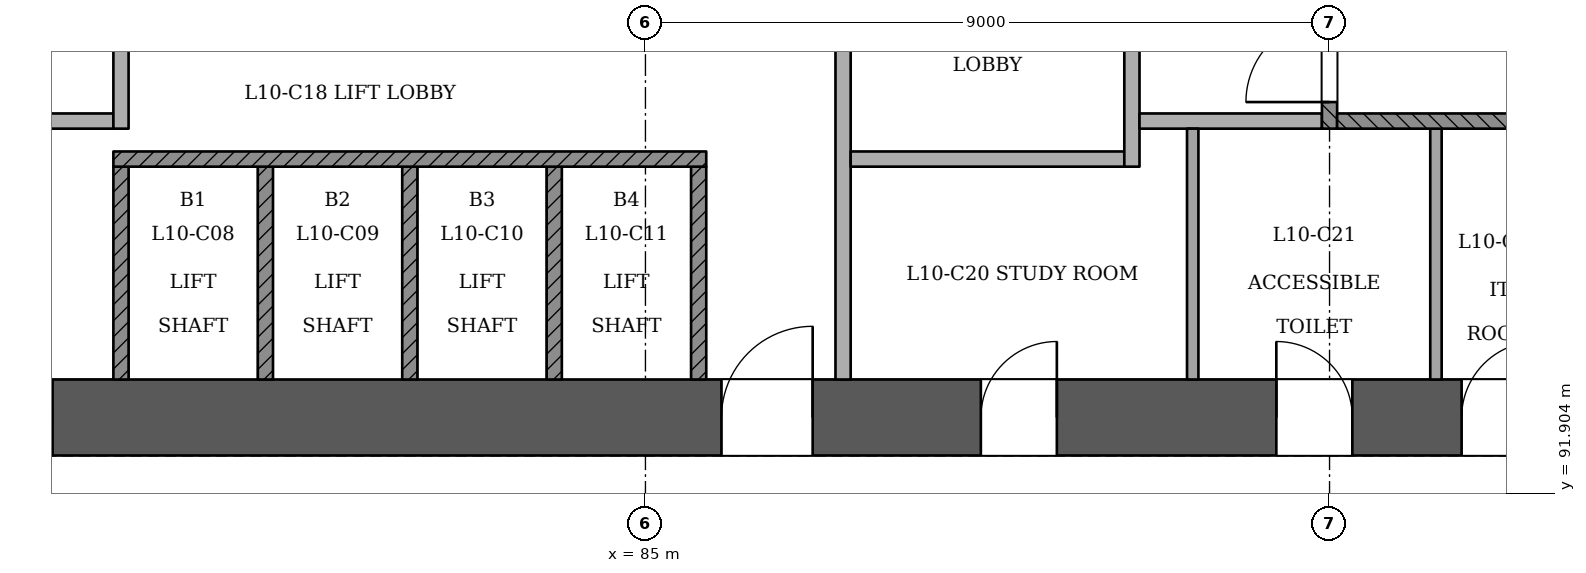
"""IFC4 building model, lengths in metres.
Left out: names, types, materials, properties, quantities, classifications, styles, units other than length and angle.
Written with IfcOpenShell. Run it as: python <this file> out.ifc"""

import sys

from ifc_helpers import new_model, si_unit, direction, frame, frame_2d, origin, place, context, subcontext, project, spatial, rectangle, extrude, element, fill, save


model = new_model("IFC4")
c1 = context("Model", 3, precision=1e-05, world=origin(), true_north=direction((0.0, 1.0)))
c2 = subcontext(c1, "Body", "Model", "MODEL_VIEW")
j1 = project(units=[si_unit("LENGTHUNIT", "METRE"), si_unit("PLANEANGLEUNIT", "RADIAN")], contexts=[c1])
p1 = place(None, origin())
s1 = spatial("IfcSite", under=j1, at=p1, CompositionType="ELEMENT")
p2 = place(p1, origin())
s2 = spatial("IfcBuilding", under=s1, at=p2, CompositionType="ELEMENT")
p3 = place(p2, frame((0.0, 0.0, 45.0)))
s3 = spatial("IfcBuildingStorey", under=s2, at=p3, CompositionType="ELEMENT", Elevation=45.0)
p4 = place(p3, frame((72.5, 92.9, 0.0), z_axis=(0.0, 0.0, 1.0), x_axis=(1.0, 0.0, 0.0)))
e1 = element("IfcWall", 1, at=p4, inside=s3, PredefinedType="SHEAR", context=c2, shape_type="SweptSolid", body=[
    extrude(rectangle(XDim=25.5, YDim=1.0, at=frame_2d((12.75, 0.0))), origin(), (0.0, 0.0, 1.0), 3.6),
])
p5 = place(p4, frame((1.3, 0.0, 0.0)))
e2 = element("IfcOpeningElement", 2, at=p5, cuts=e1, PredefinedType="OPENING", context=c2, shape_type="SweptSolid", body=[
    extrude(rectangle(XDim=1.2, YDim=2.1, at=frame_2d((0.6, 1.05))), frame((0.0, 0.51, 0.0), z_axis=(0.0, -1.0, 0.0), x_axis=(1.0, 0.0, 0.0)), (0.0, 0.0, 1.0), 1.021),
])
p6 = place(p4, frame((3.5, 0.0, 0.0)))
e3 = element("IfcOpeningElement", 3, at=p6, cuts=e1, PredefinedType="OPENING", context=c2, shape_type="SweptSolid", body=[
    extrude(rectangle(XDim=1.2, YDim=2.1, at=frame_2d((0.6, 1.05))), frame((0.0, 0.51, 0.0), z_axis=(0.0, -1.0, 0.0), x_axis=(1.0, 0.0, 0.0)), (0.0, 0.0, 1.0), 1.021),
])
p7 = place(p4, frame((13.5, 0.0, 0.0)))
e4 = element("IfcOpeningElement", 4, at=p7, cuts=e1, PredefinedType="OPENING", context=c2, shape_type="SweptSolid", body=[
    extrude(rectangle(XDim=1.2, YDim=2.1, at=frame_2d((0.6, 1.05))), frame((0.0, 0.51, 0.0), z_axis=(0.0, -1.0, 0.0), x_axis=(1.0, 0.0, 0.0)), (0.0, 0.0, 1.0), 1.021),
])
p8 = place(p4, frame((16.913, 0.0, 0.0)))
e5 = element("IfcOpeningElement", 5, at=p8, cuts=e1, PredefinedType="OPENING", context=c2, shape_type="SweptSolid", body=[
    extrude(rectangle(XDim=1.0, YDim=2.1, at=frame_2d((0.5, 1.05))), frame((0.0, 0.51, 0.0), z_axis=(0.0, -1.0, 0.0), x_axis=(1.0, 0.0, 0.0)), (0.0, 0.0, 1.0), 1.021),
])
p9 = place(p4, frame((20.8, 0.0, 0.0)))
e6 = element("IfcOpeningElement", 6, at=p9, cuts=e1, PredefinedType="OPENING", context=c2, shape_type="SweptSolid", body=[
    extrude(rectangle(XDim=1.0, YDim=2.1, at=frame_2d((0.5, 1.05))), frame((0.0, 0.51, 0.0), z_axis=(0.0, -1.0, 0.0), x_axis=(1.0, 0.0, 0.0)), (0.0, 0.0, 1.0), 1.021),
])
p10 = place(p4, frame((23.238, 0.0, 0.0)))
e7 = element("IfcOpeningElement", 7, at=p10, cuts=e1, PredefinedType="OPENING", context=c2, shape_type="SweptSolid", body=[
    extrude(rectangle(XDim=1.0, YDim=2.1, at=frame_2d((0.5, 1.05))), frame((0.0, 0.51, 0.0), z_axis=(0.0, -1.0, 0.0), x_axis=(1.0, 0.0, 0.0)), (0.0, 0.0, 1.0), 1.021),
])
p11 = place(p3, frame((61.853, 96.477, 0.0), z_axis=(0.0, 0.0, 1.0), x_axis=(0.500000327816, -0.86602521452, 0.0)))
e8 = element("IfcWall", 8, at=p11, inside=s3, PredefinedType="PARTITIONING", context=c2, shape_type="SweptSolid", body=[
    extrude(rectangle(XDim=39.979, YDim=0.15, at=frame_2d((19.99, 0.0))), origin(), (0.0, 0.0, 1.0), 2.7),
])
p12 = place(p11, frame((1.49, 0.0, 0.0)))
e9 = element("IfcOpeningElement", 9, at=p12, cuts=e8, PredefinedType="OPENING", context=c2, shape_type="SweptSolid", body=[
    extrude(rectangle(XDim=1.0, YDim=2.1, at=frame_2d((0.5, 1.05))), frame((0.0, 0.085, 0.0), z_axis=(0.0, -1.0, 0.0), x_axis=(1.0, 0.0, 0.0)), (0.0, 0.0, 1.0), 0.171),
])
p13 = place(p11, frame((4.55, 0.0, 0.0)))
e10 = element("IfcOpeningElement", 10, at=p13, cuts=e8, PredefinedType="OPENING", context=c2, shape_type="SweptSolid", body=[
    extrude(rectangle(XDim=1.1, YDim=2.1, at=frame_2d((0.55, 1.05))), frame((0.0, 0.085, 0.0), z_axis=(0.0, -1.0, 0.0), x_axis=(1.0, 0.0, 0.0)), (0.0, 0.0, 1.0), 0.171),
])
p14 = place(p11, frame((11.259, 0.0, 0.0)))
e11 = element("IfcOpeningElement", 11, at=p14, cuts=e8, PredefinedType="OPENING", context=c2, shape_type="SweptSolid", body=[
    extrude(rectangle(XDim=1.0, YDim=2.1, at=frame_2d((0.5, 1.05))), frame((0.0, 0.085, 0.0), z_axis=(0.0, -1.0, 0.0), x_axis=(1.0, 0.0, 0.0)), (0.0, 0.0, 1.0), 0.171),
])
p15 = place(p11, frame((17.979, 0.0, 0.0)))
e12 = element("IfcOpeningElement", 12, at=p15, cuts=e8, PredefinedType="OPENING", context=c2, shape_type="SweptSolid", body=[
    extrude(rectangle(XDim=1.2, YDim=2.1, at=frame_2d((0.6, 1.05))), frame((0.0, 0.085, 0.0), z_axis=(0.0, -1.0, 0.0), x_axis=(1.0, 0.0, 0.0)), (0.0, 0.0, 1.0), 0.171),
])
p16 = place(p11, frame((22.699, 0.0, 0.0)))
e13 = element("IfcOpeningElement", 13, at=p16, cuts=e8, PredefinedType="OPENING", context=c2, shape_type="SweptSolid", body=[
    extrude(rectangle(XDim=1.0, YDim=2.1, at=frame_2d((0.5, 1.05))), frame((0.0, 0.085, 0.0), z_axis=(0.0, -1.0, 0.0), x_axis=(1.0, 0.0, 0.0)), (0.0, 0.0, 1.0), 0.171),
])
p17 = place(p11, frame((29.374, 0.0, 0.0)))
e14 = element("IfcOpeningElement", 14, at=p17, cuts=e8, PredefinedType="OPENING", context=c2, shape_type="SweptSolid", body=[
    extrude(rectangle(XDim=1.0, YDim=2.1, at=frame_2d((0.5, 1.05))), frame((0.0, 0.085, 0.0), z_axis=(0.0, -1.0, 0.0), x_axis=(1.0, 0.0, 0.0)), (0.0, 0.0, 1.0), 0.171),
])
p18 = place(p11, frame((31.584, 0.0, 0.0)))
e15 = element("IfcOpeningElement", 15, at=p18, cuts=e8, PredefinedType="OPENING", context=c2, shape_type="SweptSolid", body=[
    extrude(rectangle(XDim=1.0, YDim=2.1, at=frame_2d((0.5, 1.05))), frame((0.0, 0.085, 0.0), z_axis=(0.0, -1.0, 0.0), x_axis=(1.0, 0.0, 0.0)), (0.0, 0.0, 1.0), 0.171),
])
p19 = place(p11, frame((38.374, 0.0, 0.0)))
e16 = element("IfcOpeningElement", 16, at=p19, cuts=e8, PredefinedType="OPENING", context=c2, shape_type="SweptSolid", body=[
    extrude(rectangle(XDim=1.0, YDim=2.1, at=frame_2d((0.5, 1.05))), frame((0.0, 0.085, 0.0), z_axis=(0.0, -1.0, 0.0), x_axis=(1.0, 0.0, 0.0)), (0.0, 0.0, 1.0), 0.171),
])
p20 = place(p3, frame((89.157, 63.586, 0.0), z_axis=(0.0, 0.0, 1.0), x_axis=(0.500000960059, 0.866024849493, 0.0)))
e17 = element("IfcWall", 17, at=p20, inside=s3, PredefinedType="PARTITIONING", context=c2, shape_type="SweptSolid", body=[
    extrude(rectangle(XDim=36.6, YDim=0.15, at=frame_2d((18.3, 0.0))), origin(), (0.0, 0.0, 1.0), 2.7),
])
p21 = place(p20, frame((5.395, 0.0, 0.0)))
e18 = element("IfcOpeningElement", 18, at=p21, cuts=e17, PredefinedType="OPENING", context=c2, shape_type="SweptSolid", body=[
    extrude(rectangle(XDim=1.0, YDim=2.1, at=frame_2d((0.5, 1.05))), frame((0.0, 0.085, 0.0), z_axis=(0.0, -1.0, 0.0), x_axis=(1.0, 0.0, 0.0)), (0.0, 0.0, 1.0), 0.171),
])
p22 = place(p20, frame((7.605, 0.0, 0.0)))
e19 = element("IfcOpeningElement", 19, at=p22, cuts=e17, PredefinedType="OPENING", context=c2, shape_type="SweptSolid", body=[
    extrude(rectangle(XDim=1.0, YDim=2.1, at=frame_2d((0.5, 1.05))), frame((0.0, 0.085, 0.0), z_axis=(0.0, -1.0, 0.0), x_axis=(1.0, 0.0, 0.0)), (0.0, 0.0, 1.0), 0.171),
])
p23 = place(p20, frame((13.25, 0.0, 0.0)))
e20 = element("IfcOpeningElement", 20, at=p23, cuts=e17, PredefinedType="OPENING", context=c2, shape_type="SweptSolid", body=[
    extrude(rectangle(XDim=1.0, YDim=2.1, at=frame_2d((0.5, 1.05))), frame((0.0, 0.085, 0.0), z_axis=(0.0, -1.0, 0.0), x_axis=(1.0, 0.0, 0.0)), (0.0, 0.0, 1.0), 0.171),
])
p24 = place(p20, frame((16.605, 0.0, 0.0)))
e21 = element("IfcOpeningElement", 21, at=p24, cuts=e17, PredefinedType="OPENING", context=c2, shape_type="SweptSolid", body=[
    extrude(rectangle(XDim=1.0, YDim=2.1, at=frame_2d((0.5, 1.05))), frame((0.0, 0.085, 0.0), z_axis=(0.0, -1.0, 0.0), x_axis=(1.0, 0.0, 0.0)), (0.0, 0.0, 1.0), 0.171),
])
p25 = place(p20, frame((23.395, 0.0, 0.0)))
e22 = element("IfcOpeningElement", 22, at=p25, cuts=e17, PredefinedType="OPENING", context=c2, shape_type="SweptSolid", body=[
    extrude(rectangle(XDim=1.0, YDim=2.1, at=frame_2d((0.5, 1.05))), frame((0.0, 0.085, 0.0), z_axis=(0.0, -1.0, 0.0), x_axis=(1.0, 0.0, 0.0)), (0.0, 0.0, 1.0), 0.171),
])
p26 = place(p20, frame((27.8, 0.0, 0.0)))
e23 = element("IfcOpeningElement", 23, at=p26, cuts=e17, PredefinedType="OPENING", context=c2, shape_type="SweptSolid", body=[
    extrude(rectangle(XDim=1.2, YDim=2.1, at=frame_2d((0.6, 1.05))), frame((0.0, 0.085, 0.0), z_axis=(0.0, -1.0, 0.0), x_axis=(1.0, 0.0, 0.0)), (0.0, 0.0, 1.0), 0.171),
])
p27 = place(p20, frame((35.36, 0.0, 0.0)))
e24 = element("IfcOpeningElement", 24, at=p27, cuts=e17, PredefinedType="OPENING", context=c2, shape_type="SweptSolid", body=[
    extrude(rectangle(XDim=1.0, YDim=2.1, at=frame_2d((0.5, 1.05))), frame((0.0, 0.085, 0.0), z_axis=(0.0, -1.0, 0.0), x_axis=(1.0, 0.0, 0.0)), (0.0, 0.0, 1.0), 0.171),
])
for number, where, z_axis, x_axis in (
    (25, (78.1, 93.4, 0.0), (0.0, 0.0, 1.0), (0.0, 1.0, 0.0)),
    (26, (80.0, 93.4, 0.0), (0.0, 0.0, 1.0), (0.0, 1.0, 0.0)),
    (27, (81.9, 93.4, 0.0), (0.0, 0.0, 1.0), (0.0, 1.0, 0.0)),
    (28, (83.8, 93.4, 0.0), (0.0, 0.0, 1.0), (0.0, 1.0, 0.0)),
    (29, (85.7, 93.4, 0.0), (0.0, 0.0, 1.0), (0.0, 1.0, 0.0)),
):
    element("IfcWall", number, at=place(p3, frame(where, z_axis=z_axis, x_axis=x_axis)), inside=s3, PredefinedType="SOLIDWALL", context=c2, shape_type="SweptSolid", body=[
        extrude(rectangle(XDim=2.8, YDim=0.2, at=frame_2d((1.4, 0.0))), origin(), (0.0, 0.0, 1.0), 3.1),
    ])
p28 = place(p3, frame((87.6, 93.4, 0.0), z_axis=(0.0, 0.0, 1.0), x_axis=(0.0, 1.0, 0.0)))
e30 = element("IfcWall", 30, at=p28, inside=s3, PredefinedType="PARTITIONING", context=c2, shape_type="SweptSolid", body=[
    extrude(rectangle(XDim=7.0, YDim=0.2, at=frame_2d((3.5, 0.0))), origin(), (0.0, 0.0, 1.0), 3.1),
])
p29 = place(p28, frame((4.45, 0.0, 0.0)))
e31 = element("IfcOpeningElement", 31, at=p29, cuts=e30, PredefinedType="OPENING", context=c2, shape_type="SweptSolid", body=[
    extrude(rectangle(XDim=1.1, YDim=2.1, at=frame_2d((0.55, 1.05))), frame((0.0, 0.11, 0.0), z_axis=(0.0, -1.0, 0.0), x_axis=(1.0, 0.0, 0.0)), (0.0, 0.0, 1.0), 0.221),
])
for number, where, z_axis, x_axis in (
    (32, (92.2, 93.4, 0.0), (0.0, 0.0, 1.0), (0.0, 1.0, 0.0)),
    (33, (95.4, 93.4, 0.0), (0.0, 0.0, 1.0), (0.0, 1.0, 0.0)),
):
    element("IfcWall", number, at=place(p3, frame(where, z_axis=z_axis, x_axis=x_axis)), inside=s3, PredefinedType="PARTITIONING", context=c2, shape_type="SweptSolid", body=[
        extrude(rectangle(XDim=3.3, YDim=0.15, at=frame_2d((1.65, 0.0))), origin(), (0.0, 0.0, 1.0), 3.1),
    ])
p30 = place(p3, frame((78.0, 96.3, 0.0), z_axis=(0.0, 0.0, 1.0), x_axis=(1.0, 0.0, 0.0)))
e34 = element("IfcWall", 34, at=p30, inside=s3, PredefinedType="SOLIDWALL", context=c2, shape_type="SweptSolid", body=[
    extrude(rectangle(XDim=7.8, YDim=0.2, at=frame_2d((3.9, 0.0))), origin(), (0.0, 0.0, 1.0), 3.1),
])
p31 = place(p3, frame((87.7, 96.3, 0.0), z_axis=(0.0, 0.0, 1.0), x_axis=(1.0, 0.0, 0.0)))
e35 = element("IfcWall", 35, at=p31, inside=s3, PredefinedType="PARTITIONING", context=c2, shape_type="SweptSolid", body=[
    extrude(rectangle(XDim=3.6, YDim=0.2, at=frame_2d((1.8, 0.0))), origin(), (0.0, 0.0, 1.0), 3.1),
])
p32 = place(p3, frame((91.4, 96.2, 0.0), z_axis=(0.0, 0.0, 1.0), x_axis=(0.0, 1.0, 0.0)))
e36 = element("IfcWall", 36, at=p32, inside=s3, PredefinedType="PARTITIONING", context=c2, shape_type="SweptSolid", body=[
    extrude(rectangle(XDim=4.2, YDim=0.2, at=frame_2d((2.1, 0.0))), origin(), (0.0, 0.0, 1.0), 3.1),
])
p33 = place(p32, frame((2.45, 0.0, 0.0)))
e37 = element("IfcOpeningElement", 37, at=p33, cuts=e36, PredefinedType="OPENING", context=c2, shape_type="SweptSolid", body=[
    extrude(rectangle(XDim=1.1, YDim=2.1, at=frame_2d((0.55, 1.05))), frame((0.0, 0.11, 0.0), z_axis=(0.0, -1.0, 0.0), x_axis=(1.0, 0.0, 0.0)), (0.0, 0.0, 1.0), 0.221),
])
p34 = place(p3, frame((76.1, 96.8, 0.0), z_axis=(0.0, 0.0, 1.0), x_axis=(1.0, 0.0, 0.0)))
e38 = element("IfcWall", 38, at=p34, inside=s3, PredefinedType="PARTITIONING", context=c2, shape_type="SweptSolid", body=[
    extrude(rectangle(XDim=1.9, YDim=0.2, at=frame_2d((0.95, 0.0))), origin(), (0.0, 0.0, 1.0), 3.1),
])
p35 = place(p3, frame((78.1, 96.7, 0.0), z_axis=(0.0, 0.0, 1.0), x_axis=(0.0, 1.0, 0.0)))
e39 = element("IfcWall", 39, at=p35, inside=s3, PredefinedType="PARTITIONING", context=c2, shape_type="SweptSolid", body=[
    extrude(rectangle(XDim=3.7, YDim=0.2, at=frame_2d((1.85, 0.0))), origin(), (0.0, 0.0, 1.0), 3.1),
])
p36 = place(p35, frame((1.95, 0.0, 0.0)))
e40 = element("IfcOpeningElement", 40, at=p36, cuts=e39, PredefinedType="OPENING", context=c2, shape_type="SweptSolid", body=[
    extrude(rectangle(XDim=1.1, YDim=2.1, at=frame_2d((0.55, 1.05))), frame((0.0, 0.11, 0.0), z_axis=(0.0, -1.0, 0.0), x_axis=(1.0, 0.0, 0.0)), (0.0, 0.0, 1.0), 0.221),
])
p37 = place(p3, frame((91.5, 96.8, 0.0), z_axis=(0.0, 0.0, 1.0), x_axis=(1.0, 0.0, 0.0)))
e41 = element("IfcWall", 41, at=p37, inside=s3, PredefinedType="PARTITIONING", context=c2, shape_type="SweptSolid", body=[
    extrude(rectangle(XDim=2.4, YDim=0.2, at=frame_2d((1.2, 0.0))), origin(), (0.0, 0.0, 1.0), 3.1),
])
p38 = place(p3, frame((94.0, 96.7, 0.0), z_axis=(0.0, 0.0, 1.0), x_axis=(0.0, 1.0, 0.0)))
e42 = element("IfcWall", 42, at=p38, inside=s3, PredefinedType="SOLIDWALL", context=c2, shape_type="SweptSolid", body=[
    extrude(rectangle(XDim=3.7, YDim=0.2, at=frame_2d((1.85, 0.0))), origin(), (0.0, 0.0, 1.0), 3.1),
])
p39 = place(p38, frame((0.35, 0.0, 0.0)))
e43 = element("IfcOpeningElement", 43, at=p39, cuts=e42, PredefinedType="OPENING", context=c2, shape_type="SweptSolid", body=[
    extrude(rectangle(XDim=1.1, YDim=2.1, at=frame_2d((0.55, 1.05))), frame((0.0, 0.11, 0.0), z_axis=(0.0, -1.0, 0.0), x_axis=(1.0, 0.0, 0.0)), (0.0, 0.0, 1.0), 0.221),
])
p40 = place(p3, frame((94.1, 96.8, 0.0), z_axis=(0.0, 0.0, 1.0), x_axis=(1.0, 0.0, 0.0)))
e44 = element("IfcWall", 44, at=p40, inside=s3, PredefinedType="SOLIDWALL", context=c2, shape_type="SweptSolid", body=[
    extrude(rectangle(XDim=2.9, YDim=0.2, at=frame_2d((1.45, 0.0))), origin(), (0.0, 0.0, 1.0), 3.1),
])
p41 = place(p39, origin())
e45 = element("IfcDoor", 45, at=p41, inside=s3, OperationType="SINGLE_SWING_LEFT", PredefinedType="NOTDEFINED", context=c2, shape_type="SweptSolid", body=[
    extrude(rectangle(XDim=1.1, YDim=2.1, at=frame_2d((0.55, 1.05))), frame((0.0, 0.025, 0.0), z_axis=(0.0, -1.0, 0.0), x_axis=(1.0, 0.0, 0.0)), (0.0, 0.0, 1.0), 0.05),
])
fill(e43, e45)
p42 = place(p6, origin())
e46 = element("IfcDoor", 46, at=p42, inside=s3, OperationType="SINGLE_SWING_LEFT", PredefinedType="NOTDEFINED", context=c2, shape_type="SweptSolid", body=[
    extrude(rectangle(XDim=1.2, YDim=2.1, at=frame_2d((0.6, 1.05))), frame((0.0, 0.025, 0.0), z_axis=(0.0, -1.0, 0.0), x_axis=(1.0, 0.0, 0.0)), (0.0, 0.0, 1.0), 0.05),
])
fill(e3, e46)
p43 = place(p7, origin())
e47 = element("IfcDoor", 47, at=p43, inside=s3, OperationType="SINGLE_SWING_RIGHT", PredefinedType="NOTDEFINED", context=c2, shape_type="SweptSolid", body=[
    extrude(rectangle(XDim=1.2, YDim=2.1, at=frame_2d((0.6, 1.05))), frame((0.0, 0.025, 0.0), z_axis=(0.0, -1.0, 0.0), x_axis=(1.0, 0.0, 0.0)), (0.0, 0.0, 1.0), 0.05),
])
fill(e4, e47)
p44 = place(p8, origin())
e48 = element("IfcDoor", 48, at=p44, inside=s3, OperationType="SINGLE_SWING_RIGHT", PredefinedType="NOTDEFINED", context=c2, shape_type="SweptSolid", body=[
    extrude(rectangle(XDim=1.0, YDim=2.1, at=frame_2d((0.5, 1.05))), frame((0.0, 0.025, 0.0), z_axis=(0.0, -1.0, 0.0), x_axis=(1.0, 0.0, 0.0)), (0.0, 0.0, 1.0), 0.05),
])
fill(e5, e48)
p45 = place(p9, origin())
e49 = element("IfcDoor", 49, at=p45, inside=s3, OperationType="SINGLE_SWING_LEFT", PredefinedType="NOTDEFINED", context=c2, shape_type="SweptSolid", body=[
    extrude(rectangle(XDim=1.0, YDim=2.1, at=frame_2d((0.5, 1.05))), frame((0.0, 0.025, 0.0), z_axis=(0.0, -1.0, 0.0), x_axis=(1.0, 0.0, 0.0)), (0.0, 0.0, 1.0), 0.05),
])
fill(e6, e49)
p46 = place(p10, origin())
e50 = element("IfcDoor", 50, at=p46, inside=s3, OperationType="SINGLE_SWING_RIGHT", PredefinedType="NOTDEFINED", context=c2, shape_type="SweptSolid", body=[
    extrude(rectangle(XDim=1.0, YDim=2.1, at=frame_2d((0.5, 1.05))), frame((0.0, 0.025, 0.0), z_axis=(0.0, -1.0, 0.0), x_axis=(1.0, 0.0, 0.0)), (0.0, 0.0, 1.0), 0.05),
])
fill(e7, e50)
save(model, sys.argv[1])
